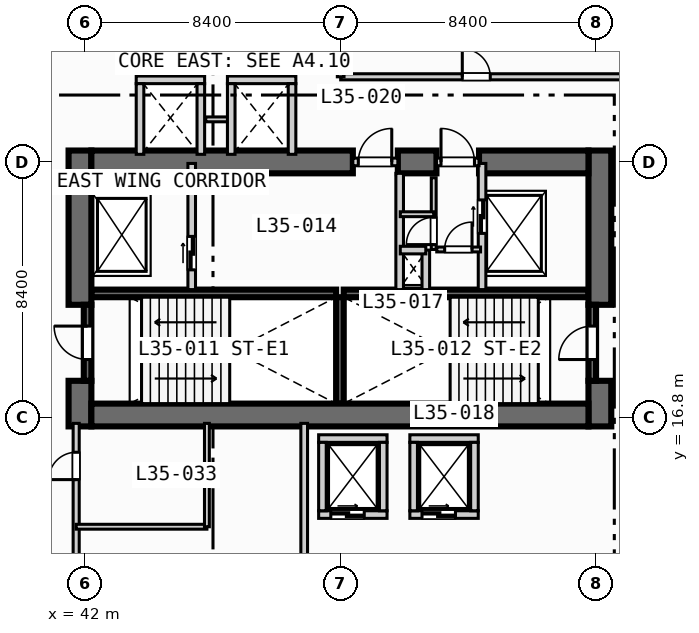
"""IFC4 building model, lengths in metres.
Left out: names, types, materials, properties, quantities, classifications, styles, units other than length and angle.
Written with IfcOpenShell. Run it as: python <this file> out.ifc"""

import sys

from ifc_helpers import new_model, si_unit, direction, frame, frame_2d, origin, place, context, subcontext, project, spatial, rectangle, extrude, element, fill, save


model = new_model("IFC4")
c1 = context("Model", 3, precision=1e-05, world=origin(), true_north=direction((0.0, 1.0)))
c2 = subcontext(c1, "Body", "Model", "MODEL_VIEW")
j1 = project(units=[si_unit("LENGTHUNIT", "METRE"), si_unit("PLANEANGLEUNIT", "RADIAN")], contexts=[c1])
p1 = place(None, origin())
s1 = spatial("IfcSite", under=j1, at=p1, CompositionType="ELEMENT")
p2 = place(p1, origin())
s2 = spatial("IfcBuilding", under=s1, at=p2, CompositionType="ELEMENT")
p3 = place(p2, frame((0.0, 0.0, 145.6)))
s3 = spatial("IfcBuildingStorey", under=s2, at=p3, CompositionType="ELEMENT", Elevation=145.6)
for number, where, z_axis, x_axis in (
    (1, (42.2, 20.875, 0.0), (0.0, 0.0, 1.0), (1.0, 0.0, 0.0)),
    (2, (50.5, 20.875, 0.0), (0.0, 0.0, 1.0), (1.0, 0.0, 0.0)),
):
    element("IfcWall", number, at=place(p3, frame(where, z_axis=z_axis, x_axis=x_axis)), inside=s3, PredefinedType="SOLIDWALL", context=c2, shape_type="SweptSolid", body=[
        extrude(rectangle(XDim=8.05, YDim=0.25, at=frame_2d((4.025, 0.0))), origin(), (0.0, 0.0, 1.0), 3.55),
    ])
p4 = place(p3, frame((50.375, 17.25, 0.0), z_axis=(0.0, 0.0, 1.0), x_axis=(0.0, 1.0, 0.0)))
e3 = element("IfcWall", 3, at=p4, inside=s3, PredefinedType="SOLIDWALL", context=c2, shape_type="SweptSolid", body=[
    extrude(rectangle(XDim=3.5, YDim=0.25, at=frame_2d((1.75, 0.0))), origin(), (0.0, 0.0, 1.0), 3.55),
])
p5 = place(p3, frame((41.825, 16.5, 0.0), z_axis=(0.0, 0.0, 1.0), x_axis=(0.0, 1.0, 0.0)))
e4 = element("IfcWall", 4, at=p5, inside=s3, PredefinedType="SHEAR", context=c2, shape_type="SweptSolid", body=[
    extrude(rectangle(XDim=1.5, YDim=0.75, at=frame_2d((0.75, 0.0))), origin(), (0.0, 0.0, 1.0), 3.55),
])
p6 = place(p3, frame((41.825, 20.5, 0.0), z_axis=(0.0, 0.0, 1.0), x_axis=(0.0, 1.0, 0.0)))
e5 = element("IfcWall", 5, at=p6, inside=s3, PredefinedType="SHEAR", context=c2, shape_type="SweptSolid", body=[
    extrude(rectangle(XDim=5.075, YDim=0.75, at=frame_2d((2.538, 0.0))), origin(), (0.0, 0.0, 1.0), 3.55),
])
p7 = place(p3, frame((58.925, 16.5, 0.0), z_axis=(0.0, 0.0, 1.0), x_axis=(0.0, 1.0, 0.0)))
e6 = element("IfcWall", 6, at=p7, inside=s3, PredefinedType="SHEAR", context=c2, shape_type="SweptSolid", body=[
    extrude(rectangle(XDim=1.5, YDim=0.75, at=frame_2d((0.75, 0.0))), origin(), (0.0, 0.0, 1.0), 3.55),
])
p8 = place(p3, frame((58.925, 20.5, 0.0), z_axis=(0.0, 0.0, 1.0), x_axis=(0.0, 1.0, 0.0)))
e7 = element("IfcWall", 7, at=p8, inside=s3, PredefinedType="SHEAR", context=c2, shape_type="SweptSolid", body=[
    extrude(rectangle(XDim=5.075, YDim=0.75, at=frame_2d((2.538, 0.0))), origin(), (0.0, 0.0, 1.0), 3.55),
])
p9 = place(p3, frame((42.2, 16.875, 0.0), z_axis=(0.0, 0.0, 1.0), x_axis=(1.0, 0.0, 0.0)))
e8 = element("IfcWall", 8, at=p9, inside=s3, PredefinedType="SHEAR", context=c2, shape_type="SweptSolid", body=[
    extrude(rectangle(XDim=16.35, YDim=0.75, at=frame_2d((8.175, 0.0))), origin(), (0.0, 0.0, 1.0), 3.55),
])
p10 = place(p3, frame((42.2, 25.2, 0.0), z_axis=(0.0, 0.0, 1.0), x_axis=(1.0, 0.0, 0.0)))
e9 = element("IfcWall", 9, at=p10, inside=s3, PredefinedType="SHEAR", context=c2, shape_type="SweptSolid", body=[
    extrude(rectangle(XDim=8.6, YDim=0.75, at=frame_2d((4.3, 0.0))), origin(), (0.0, 0.0, 1.0), 3.55),
])
p11 = place(p3, frame((52.28, 25.2, 0.0), z_axis=(0.0, 0.0, 1.0), x_axis=(1.0, 0.0, 0.0)))
e10 = element("IfcWall", 10, at=p11, inside=s3, PredefinedType="SHEAR", context=c2, shape_type="SweptSolid", body=[
    extrude(rectangle(XDim=1.27, YDim=0.75, at=frame_2d((0.635, 0.0))), origin(), (0.0, 0.0, 1.0), 3.55),
])
p12 = place(p3, frame((54.95, 25.2, 0.0), z_axis=(0.0, 0.0, 1.0), x_axis=(1.0, 0.0, 0.0)))
e11 = element("IfcWall", 11, at=p12, inside=s3, PredefinedType="SHEAR", context=c2, shape_type="SweptSolid", body=[
    extrude(rectangle(XDim=3.6, YDim=0.75, at=frame_2d((1.8, 0.0))), origin(), (0.0, 0.0, 1.0), 3.55),
])
p13 = place(p3, frame((42.075, 18.0, 0.0), z_axis=(0.0, 0.0, 1.0), x_axis=(0.0, 1.0, 0.0)))
e12 = element("IfcWall", 12, at=p13, inside=s3, PredefinedType="SOLIDWALL", context=c2, shape_type="SweptSolid", body=[
    extrude(rectangle(XDim=2.5, YDim=0.25, at=frame_2d((1.25, 0.0))), origin(), (0.0, 0.0, 1.0), 3.55),
])
p14 = place(p13, frame((0.7, 0.0, 0.0)))
e13 = element("IfcOpeningElement", 13, at=p14, cuts=e12, PredefinedType="OPENING", context=c2, shape_type="SweptSolid", body=[
    extrude(rectangle(XDim=1.1, YDim=2.15, at=frame_2d((0.55, 1.075))), frame((0.0, 0.135, 0.0), z_axis=(0.0, -1.0, 0.0), x_axis=(1.0, 0.0, 0.0)), (0.0, 0.0, 1.0), 0.27),
])
p15 = place(p3, frame((58.675, 18.0, 0.0), z_axis=(0.0, 0.0, 1.0), x_axis=(0.0, 1.0, 0.0)))
e14 = element("IfcWall", 14, at=p15, inside=s3, PredefinedType="SOLIDWALL", context=c2, shape_type="SweptSolid", body=[
    extrude(rectangle(XDim=2.5, YDim=0.25, at=frame_2d((1.25, 0.0))), origin(), (0.0, 0.0, 1.0), 3.55),
])
p16 = place(p15, frame((0.7, 0.0, 0.0)))
e15 = element("IfcOpeningElement", 15, at=p16, cuts=e14, PredefinedType="OPENING", context=c2, shape_type="SweptSolid", body=[
    extrude(rectangle(XDim=1.1, YDim=2.15, at=frame_2d((0.55, 1.075))), frame((0.0, 0.135, 0.0), z_axis=(0.0, -1.0, 0.0), x_axis=(1.0, 0.0, 0.0)), (0.0, 0.0, 1.0), 0.27),
])
p17 = place(p3, frame((45.5, 21.0, 0.0), z_axis=(0.0, 0.0, 1.0), x_axis=(0.0, 1.0, 0.0)))
e16 = element("IfcWall", 16, at=p17, inside=s3, PredefinedType="SOLIDWALL", context=c2, shape_type="SweptSolid", body=[
    extrude(rectangle(XDim=4.15, YDim=0.25, at=frame_2d((2.075, 0.0))), origin(), (0.0, 0.0, 1.0), 3.55),
])
p18 = place(p17, frame((0.65, 0.0, 0.0)))
e17 = element("IfcOpeningElement", 17, at=p18, cuts=e16, PredefinedType="OPENING", context=c2, shape_type="SweptSolid", body=[
    extrude(rectangle(XDim=1.1, YDim=2.15, at=frame_2d((0.55, 1.075))), frame((0.0, 0.135, 0.0), z_axis=(0.0, -1.0, 0.0), x_axis=(1.0, 0.0, 0.0)), (0.0, 0.0, 1.0), 0.27),
])
p19 = place(p3, frame((50.8, 25.2, 0.0), z_axis=(0.0, 0.0, 1.0), x_axis=(1.0, 0.0, 0.0)))
e18 = element("IfcWall", 18, at=p19, inside=s3, PredefinedType="SOLIDWALL", context=c2, shape_type="SweptSolid", body=[
    extrude(rectangle(XDim=1.48, YDim=0.25, at=frame_2d((0.74, 0.0))), origin(), (0.0, 0.0, 1.0), 3.55),
])
p20 = place(p19, frame((0.18, 0.0, 0.0)))
e19 = element("IfcOpeningElement", 19, at=p20, cuts=e18, PredefinedType="OPENING", context=c2, shape_type="SweptSolid", body=[
    extrude(rectangle(XDim=1.1, YDim=2.15, at=frame_2d((0.55, 1.075))), frame((0.0, 0.135, 0.0), z_axis=(0.0, -1.0, 0.0), x_axis=(1.0, 0.0, 0.0)), (0.0, 0.0, 1.0), 0.27),
])
p21 = place(p3, frame((52.34, 21.0, 0.0), z_axis=(0.0, 0.0, 1.0), x_axis=(0.0, 1.0, 0.0)))
e20 = element("IfcWall", 20, at=p21, inside=s3, PredefinedType="SOLIDWALL", context=c2, shape_type="SweptSolid", body=[
    extrude(rectangle(XDim=3.825, YDim=0.25, at=frame_2d((1.913, 0.0))), origin(), (0.0, 0.0, 1.0), 3.55),
])
p22 = place(p3, frame((55.05, 21.0, 0.0), z_axis=(0.0, 0.0, 1.0), x_axis=(0.0, 1.0, 0.0)))
e21 = element("IfcWall", 21, at=p22, inside=s3, PredefinedType="SOLIDWALL", context=c2, shape_type="SweptSolid", body=[
    extrude(rectangle(XDim=4.15, YDim=0.25, at=frame_2d((2.075, 0.0))), origin(), (0.0, 0.0, 1.0), 3.55),
])
p23 = place(p22, frame((1.85, 0.0, 0.0)))
e22 = element("IfcOpeningElement", 22, at=p23, cuts=e21, PredefinedType="OPENING", context=c2, shape_type="SweptSolid", body=[
    extrude(rectangle(XDim=1.1, YDim=2.15, at=frame_2d((0.55, 1.075))), frame((0.0, 0.135, 0.0), z_axis=(0.0, -1.0, 0.0), x_axis=(1.0, 0.0, 0.0)), (0.0, 0.0, 1.0), 0.27),
])
p24 = place(p3, frame((53.55, 25.2, 0.0), z_axis=(0.0, 0.0, 1.0), x_axis=(1.0, 0.0, 0.0)))
e23 = element("IfcWall", 23, at=p24, inside=s3, PredefinedType="SOLIDWALL", context=c2, shape_type="SweptSolid", body=[
    extrude(rectangle(XDim=1.4, YDim=0.25, at=frame_2d((0.7, 0.0))), origin(), (0.0, 0.0, 1.0), 3.55),
])
p25 = place(p24, frame((0.15, 0.0, 0.0)))
e24 = element("IfcOpeningElement", 24, at=p25, cuts=e23, PredefinedType="OPENING", context=c2, shape_type="SweptSolid", body=[
    extrude(rectangle(XDim=1.1, YDim=2.15, at=frame_2d((0.55, 1.075))), frame((0.0, 0.135, 0.0), z_axis=(0.0, -1.0, 0.0), x_axis=(1.0, 0.0, 0.0)), (0.0, 0.0, 1.0), 0.27),
])
p26 = place(p3, frame((53.2, 21.0, 0.0), z_axis=(0.0, 0.0, 1.0), x_axis=(0.0, 1.0, 0.0)))
e25 = element("IfcWall", 25, at=p26, inside=s3, PredefinedType="SOLIDWALL", context=c2, shape_type="SweptSolid", body=[
    extrude(rectangle(XDim=1.3, YDim=0.25, at=frame_2d((0.65, 0.0))), origin(), (0.0, 0.0, 1.0), 3.55),
])
p27 = place(p3, frame((52.36, 22.3, 0.0), z_axis=(0.0, 0.0, 1.0), x_axis=(1.0, 0.0, 0.0)))
e26 = element("IfcWall", 26, at=p27, inside=s3, PredefinedType="SOLIDWALL", context=c2, shape_type="SweptSolid", body=[
    extrude(rectangle(XDim=0.84, YDim=0.25, at=frame_2d((0.42, 0.0))), origin(), (0.0, 0.0, 1.0), 3.55),
])
p28 = place(p3, frame((53.56, 22.32, 0.0), z_axis=(0.0, 0.0, 1.0), x_axis=(1.0, 0.0, 0.0)))
e27 = element("IfcWall", 27, at=p28, inside=s3, PredefinedType="PARTITIONING", context=c2, shape_type="SweptSolid", body=[
    extrude(rectangle(XDim=1.44, YDim=0.16, at=frame_2d((0.72, 0.0))), origin(), (0.0, 0.0, 1.0), 3.55),
])
p29 = place(p28, frame((0.26, 0.0, 0.0)))
e28 = element("IfcOpeningElement", 28, at=p29, cuts=e27, PredefinedType="OPENING", context=c2, shape_type="SweptSolid", body=[
    extrude(rectangle(XDim=0.9, YDim=2.1, at=frame_2d((0.45, 1.05))), frame((0.0, 0.09, 0.0), z_axis=(0.0, -1.0, 0.0), x_axis=(1.0, 0.0, 0.0)), (0.0, 0.0, 1.0), 0.18),
])
p30 = place(p3, frame((53.46, 22.32, 0.0), z_axis=(0.0, 0.0, 1.0), x_axis=(0.0, 1.0, 0.0)))
e29 = element("IfcWall", 29, at=p30, inside=s3, PredefinedType="PARTITIONING", context=c2, shape_type="SweptSolid", body=[
    extrude(rectangle(XDim=2.36, YDim=0.16, at=frame_2d((1.18, 0.0))), origin(), (0.0, 0.0, 1.0), 3.55),
])
p31 = place(p30, frame((0.16, 0.0, 0.0)))
e30 = element("IfcOpeningElement", 30, at=p31, cuts=e29, PredefinedType="OPENING", context=c2, shape_type="SweptSolid", body=[
    extrude(rectangle(XDim=0.9, YDim=2.1, at=frame_2d((0.45, 1.05))), frame((0.0, 0.09, 0.0), z_axis=(0.0, -1.0, 0.0), x_axis=(1.0, 0.0, 0.0)), (0.0, 0.0, 1.0), 0.18),
])
p32 = place(p3, frame((52.36, 23.48, 0.0), z_axis=(0.0, 0.0, 1.0), x_axis=(1.0, 0.0, 0.0)))
e31 = element("IfcWall", 31, at=p32, inside=s3, PredefinedType="PARTITIONING", context=c2, shape_type="SweptSolid", body=[
    extrude(rectangle(XDim=1.1, YDim=0.16, at=frame_2d((0.55, 0.0))), origin(), (0.0, 0.0, 1.0), 3.55),
])
p33 = place(p3, frame((49.675, 13.6, 0.0), z_axis=(0.0, 0.0, 1.0), x_axis=(1.0, 0.0, 0.0)))
e32 = element("IfcWall", 32, at=p33, inside=s3, PredefinedType="SOLIDWALL", context=c2, shape_type="SweptSolid", body=[
    extrude(rectangle(XDim=2.25, YDim=0.25, at=frame_2d((1.125, 0.0))), origin(), (0.0, 0.0, 1.0), 3.55),
])
p34 = place(p33, frame((0.4, 0.0, 0.0)))
e33 = element("IfcOpeningElement", 33, at=p34, cuts=e32, PredefinedType="OPENING", context=c2, shape_type="SweptSolid", body=[
    extrude(rectangle(XDim=1.1, YDim=2.15, at=frame_2d((0.55, 1.075))), frame((0.0, 0.135, 0.0), z_axis=(0.0, -1.0, 0.0), x_axis=(1.0, 0.0, 0.0)), (0.0, 0.0, 1.0), 0.27),
])
for number, where, z_axis, x_axis in (
    (34, (49.675, 16.1, 0.0), (0.0, 0.0, 1.0), (1.0, 0.0, 0.0)),
    (35, (49.8, 13.725, 0.0), (0.0, 0.0, 1.0), (0.0, 1.0, 0.0)),
    (36, (51.8, 13.725, 0.0), (0.0, 0.0, 1.0), (0.0, 1.0, 0.0)),
):
    element("IfcWall", number, at=place(p3, frame(where, z_axis=z_axis, x_axis=x_axis)), inside=s3, PredefinedType="SOLIDWALL", context=c2, shape_type="SweptSolid", body=[
        extrude(rectangle(XDim=2.25, YDim=0.25, at=frame_2d((1.125, 0.0))), origin(), (0.0, 0.0, 1.0), 3.55),
    ])
p35 = place(p3, frame((52.675, 13.6, 0.0), z_axis=(0.0, 0.0, 1.0), x_axis=(1.0, 0.0, 0.0)))
e37 = element("IfcWall", 37, at=p35, inside=s3, PredefinedType="SOLIDWALL", context=c2, shape_type="SweptSolid", body=[
    extrude(rectangle(XDim=2.25, YDim=0.25, at=frame_2d((1.125, 0.0))), origin(), (0.0, 0.0, 1.0), 3.55),
])
p36 = place(p35, frame((0.4, 0.0, 0.0)))
e38 = element("IfcOpeningElement", 38, at=p36, cuts=e37, PredefinedType="OPENING", context=c2, shape_type="SweptSolid", body=[
    extrude(rectangle(XDim=1.1, YDim=2.15, at=frame_2d((0.55, 1.075))), frame((0.0, 0.135, 0.0), z_axis=(0.0, -1.0, 0.0), x_axis=(1.0, 0.0, 0.0)), (0.0, 0.0, 1.0), 0.27),
])
for number, where, z_axis, x_axis in (
    (39, (52.675, 16.1, 0.0), (0.0, 0.0, 1.0), (1.0, 0.0, 0.0)),
    (40, (52.8, 13.725, 0.0), (0.0, 0.0, 1.0), (0.0, 1.0, 0.0)),
    (41, (54.8, 13.725, 0.0), (0.0, 0.0, 1.0), (0.0, 1.0, 0.0)),
    (42, (43.675, 27.9, 0.0), (0.0, 0.0, 1.0), (1.0, 0.0, 0.0)),
):
    element("IfcWall", number, at=place(p3, frame(where, z_axis=z_axis, x_axis=x_axis)), inside=s3, PredefinedType="SOLIDWALL", context=c2, shape_type="SweptSolid", body=[
        extrude(rectangle(XDim=2.25, YDim=0.25, at=frame_2d((1.125, 0.0))), origin(), (0.0, 0.0, 1.0), 3.55),
    ])
for number, where, z_axis, x_axis in (
    (43, (43.8, 25.45, 0.0), (0.0, 0.0, 1.0), (0.0, 1.0, 0.0)),
    (44, (45.8, 25.45, 0.0), (0.0, 0.0, 1.0), (0.0, 1.0, 0.0)),
):
    element("IfcWall", number, at=place(p3, frame(where, z_axis=z_axis, x_axis=x_axis)), inside=s3, PredefinedType="SOLIDWALL", context=c2, shape_type="SweptSolid", body=[
        extrude(rectangle(XDim=2.325, YDim=0.25, at=frame_2d((1.163, 0.0))), origin(), (0.0, 0.0, 1.0), 3.55),
    ])
p37 = place(p3, frame((45.96, 26.6, 0.0), z_axis=(0.0, 0.0, 1.0), x_axis=(1.0, 0.0, 0.0)))
e45 = element("IfcWall", 45, at=p37, inside=s3, PredefinedType="PARTITIONING", context=c2, shape_type="SweptSolid", body=[
    extrude(rectangle(XDim=0.88, YDim=0.16, at=frame_2d((0.44, 0.0))), origin(), (0.0, 0.0, 1.0), 3.55),
])
p38 = place(p3, frame((46.675, 27.9, 0.0), z_axis=(0.0, 0.0, 1.0), x_axis=(1.0, 0.0, 0.0)))
e46 = element("IfcWall", 46, at=p38, inside=s3, PredefinedType="SOLIDWALL", context=c2, shape_type="SweptSolid", body=[
    extrude(rectangle(XDim=2.25, YDim=0.25, at=frame_2d((1.125, 0.0))), origin(), (0.0, 0.0, 1.0), 3.55),
])
for number, where, z_axis, x_axis in (
    (47, (46.8, 25.45, 0.0), (0.0, 0.0, 1.0), (0.0, 1.0, 0.0)),
    (48, (48.8, 25.45, 0.0), (0.0, 0.0, 1.0), (0.0, 1.0, 0.0)),
):
    element("IfcWall", number, at=place(p3, frame(where, z_axis=z_axis, x_axis=x_axis)), inside=s3, PredefinedType="SOLIDWALL", context=c2, shape_type="SweptSolid", body=[
        extrude(rectangle(XDim=2.325, YDim=0.25, at=frame_2d((1.163, 0.0))), origin(), (0.0, 0.0, 1.0), 3.55),
    ])
p39 = place(p3, frame((41.7, 0.35, 0.0), z_axis=(0.0, 0.0, 1.0), x_axis=(0.0, 1.0, 0.0)))
e49 = element("IfcWall", 49, at=p39, inside=s3, PredefinedType="PARTITIONING", context=c2, shape_type="SweptSolid", body=[
    extrude(rectangle(XDim=16.25, YDim=0.2, at=frame_2d((8.125, 0.0))), origin(), (0.0, 0.0, 1.0), 2.8),
])
p40 = place(p39, frame((5.0, 0.0, 0.0)))
e50 = element("IfcOpeningElement", 50, at=p40, cuts=e49, PredefinedType="OPENING", context=c2, shape_type="SweptSolid", body=[
    extrude(rectangle(XDim=0.92, YDim=2.1, at=frame_2d((0.46, 1.05))), frame((0.0, 0.11, 0.0), z_axis=(0.0, -1.0, 0.0), x_axis=(1.0, 0.0, 0.0)), (0.0, 0.0, 1.0), 0.22),
])
p41 = place(p39, frame((14.4, 0.0, 0.0)))
e51 = element("IfcOpeningElement", 51, at=p41, cuts=e49, PredefinedType="OPENING", context=c2, shape_type="SweptSolid", body=[
    extrude(rectangle(XDim=0.9, YDim=2.1, at=frame_2d((0.45, 1.05))), frame((0.0, 0.11, 0.0), z_axis=(0.0, -1.0, 0.0), x_axis=(1.0, 0.0, 0.0)), (0.0, 0.0, 1.0), 0.22),
])
p42 = place(p3, frame((49.2, 0.35, 0.0), z_axis=(0.0, 0.0, 1.0), x_axis=(0.0, 1.0, 0.0)))
e52 = element("IfcWall", 52, at=p42, inside=s3, PredefinedType="PARTITIONING", context=c2, shape_type="SweptSolid", body=[
    extrude(rectangle(XDim=16.25, YDim=0.22, at=frame_2d((8.125, 0.0))), origin(), (0.0, 0.0, 1.0), 3.55),
])
p43 = place(p3, frame((41.7, 13.2, 0.0), z_axis=(0.0, 0.0, 1.0), x_axis=(1.0, 0.0, 0.0)))
e53 = element("IfcWall", 53, at=p43, inside=s3, PredefinedType="PARTITIONING", context=c2, shape_type="SweptSolid", body=[
    extrude(rectangle(XDim=4.3, YDim=0.16, at=frame_2d((2.15, 0.0))), origin(), (0.0, 0.0, 1.0), 3.55),
])
p44 = place(p3, frame((46.0, 13.2, 0.0), z_axis=(0.0, 0.0, 1.0), x_axis=(0.0, 1.0, 0.0)))
e54 = element("IfcWall", 54, at=p44, inside=s3, PredefinedType="PARTITIONING", context=c2, shape_type="SweptSolid", body=[
    extrude(rectangle(XDim=3.4, YDim=0.16, at=frame_2d((1.7, 0.0))), origin(), (0.0, 0.0, 1.0), 3.55),
])
p45 = place(p3, frame((50.4, 28.0, 0.0), z_axis=(0.0, 0.0, 1.0), x_axis=(1.0, 0.0, 0.0)))
e55 = element("IfcWall", 55, at=p45, inside=s3, PredefinedType="PARTITIONING", context=c2, shape_type="SweptSolid", body=[
    extrude(rectangle(XDim=21.8, YDim=0.2, at=frame_2d((10.9, 0.0))), origin(), (0.0, 0.0, 1.0), 3.55),
])
p46 = place(p45, frame((4.0, 0.0, 0.0)))
e56 = element("IfcOpeningElement", 56, at=p46, cuts=e55, PredefinedType="OPENING", context=c2, shape_type="SweptSolid", body=[
    extrude(rectangle(XDim=0.92, YDim=2.1, at=frame_2d((0.46, 1.05))), frame((0.0, 0.11, 0.0), z_axis=(0.0, -1.0, 0.0), x_axis=(1.0, 0.0, 0.0)), (0.0, 0.0, 1.0), 0.22),
])
p47 = place(p3, frame((50.4, 28.0, 0.0), z_axis=(0.0, 0.0, 1.0), x_axis=(0.0, 1.0, 0.0)))
e57 = element("IfcWall", 57, at=p47, inside=s3, PredefinedType="PARTITIONING", context=c2, shape_type="SweptSolid", body=[
    extrude(rectangle(XDim=5.3, YDim=0.22, at=frame_2d((2.65, 0.0))), origin(), (0.0, 0.0, 1.0), 3.133),
])
p48 = place(p14, origin())
e58 = element("IfcDoor", 58, at=p48, inside=s3, OperationType="SINGLE_SWING_RIGHT", PredefinedType="DOOR", context=c2, shape_type="SweptSolid", body=[
    extrude(rectangle(XDim=1.1, YDim=2.15, at=frame_2d((0.55, 1.075))), frame((0.0, 0.025, 0.0), z_axis=(0.0, -1.0, 0.0), x_axis=(1.0, 0.0, 0.0)), (0.0, 0.0, 1.0), 0.05),
])
fill(e13, e58)
p49 = place(p16, origin())
e59 = element("IfcDoor", 59, at=p49, inside=s3, OperationType="SINGLE_SWING_LEFT", PredefinedType="DOOR", context=c2, shape_type="SweptSolid", body=[
    extrude(rectangle(XDim=1.1, YDim=2.15, at=frame_2d((0.55, 1.075))), frame((0.0, 0.025, 0.0), z_axis=(0.0, -1.0, 0.0), x_axis=(1.0, 0.0, 0.0)), (0.0, 0.0, 1.0), 0.05),
])
fill(e15, e59)
p50 = place(p18, origin())
e60 = element("IfcDoor", 60, at=p50, inside=s3, OperationType="SLIDING_TO_LEFT", PredefinedType="DOOR", context=c2, shape_type="SweptSolid", body=[
    extrude(rectangle(XDim=1.1, YDim=2.15, at=frame_2d((0.55, 1.075))), frame((0.0, 0.025, 0.0), z_axis=(0.0, -1.0, 0.0), x_axis=(1.0, 0.0, 0.0)), (0.0, 0.0, 1.0), 0.05),
])
fill(e17, e60)
p51 = place(p20, origin())
e61 = element("IfcDoor", 61, at=p51, inside=s3, OperationType="SINGLE_SWING_RIGHT", PredefinedType="DOOR", context=c2, shape_type="SweptSolid", body=[
    extrude(rectangle(XDim=1.1, YDim=2.15, at=frame_2d((0.55, 1.075))), frame((0.0, 0.025, 0.0), z_axis=(0.0, -1.0, 0.0), x_axis=(1.0, 0.0, 0.0)), (0.0, 0.0, 1.0), 0.05),
])
fill(e19, e61)
p52 = place(p23, origin())
e62 = element("IfcDoor", 62, at=p52, inside=s3, OperationType="SLIDING_TO_LEFT", PredefinedType="DOOR", context=c2, shape_type="SweptSolid", body=[
    extrude(rectangle(XDim=1.1, YDim=2.15, at=frame_2d((0.55, 1.075))), frame((0.0, 0.025, 0.0), z_axis=(0.0, -1.0, 0.0), x_axis=(1.0, 0.0, 0.0)), (0.0, 0.0, 1.0), 0.05),
])
fill(e22, e62)
p53 = place(p25, origin())
e63 = element("IfcDoor", 63, at=p53, inside=s3, OperationType="SINGLE_SWING_LEFT", PredefinedType="DOOR", context=c2, shape_type="SweptSolid", body=[
    extrude(rectangle(XDim=1.1, YDim=2.15, at=frame_2d((0.55, 1.075))), frame((0.0, 0.025, 0.0), z_axis=(0.0, -1.0, 0.0), x_axis=(1.0, 0.0, 0.0)), (0.0, 0.0, 1.0), 0.05),
])
fill(e24, e63)
p54 = place(p29, origin())
e64 = element("IfcDoor", 64, at=p54, inside=s3, OperationType="SINGLE_SWING_RIGHT", PredefinedType="DOOR", context=c2, shape_type="SweptSolid", body=[
    extrude(rectangle(XDim=0.9, YDim=2.1, at=frame_2d((0.45, 1.05))), frame((0.0, 0.025, 0.0), z_axis=(0.0, -1.0, 0.0), x_axis=(1.0, 0.0, 0.0)), (0.0, 0.0, 1.0), 0.05),
])
fill(e28, e64)
p55 = place(p31, origin())
e65 = element("IfcDoor", 65, at=p55, inside=s3, OperationType="SINGLE_SWING_LEFT", PredefinedType="DOOR", context=c2, shape_type="SweptSolid", body=[
    extrude(rectangle(XDim=0.9, YDim=2.1, at=frame_2d((0.45, 1.05))), frame((0.0, 0.025, 0.0), z_axis=(0.0, -1.0, 0.0), x_axis=(1.0, 0.0, 0.0)), (0.0, 0.0, 1.0), 0.05),
])
fill(e30, e65)
p56 = place(p34, origin())
e66 = element("IfcDoor", 66, at=p56, inside=s3, OperationType="SLIDING_TO_LEFT", PredefinedType="DOOR", context=c2, shape_type="SweptSolid", body=[
    extrude(rectangle(XDim=1.1, YDim=2.15, at=frame_2d((0.55, 1.075))), frame((0.0, 0.025, 0.0), z_axis=(0.0, -1.0, 0.0), x_axis=(1.0, 0.0, 0.0)), (0.0, 0.0, 1.0), 0.05),
])
fill(e33, e66)
p57 = place(p36, origin())
e67 = element("IfcDoor", 67, at=p57, inside=s3, OperationType="SLIDING_TO_LEFT", PredefinedType="DOOR", context=c2, shape_type="SweptSolid", body=[
    extrude(rectangle(XDim=1.1, YDim=2.15, at=frame_2d((0.55, 1.075))), frame((0.0, 0.025, 0.0), z_axis=(0.0, -1.0, 0.0), x_axis=(1.0, 0.0, 0.0)), (0.0, 0.0, 1.0), 0.05),
])
fill(e38, e67)
p58 = place(p41, origin())
e68 = element("IfcDoor", 68, at=p58, inside=s3, OperationType="SINGLE_SWING_LEFT", PredefinedType="DOOR", context=c2, shape_type="SweptSolid", body=[
    extrude(rectangle(XDim=0.9, YDim=2.1, at=frame_2d((0.45, 1.05))), frame((0.0, 0.025, 0.0), z_axis=(0.0, -1.0, 0.0), x_axis=(1.0, 0.0, 0.0)), (0.0, 0.0, 1.0), 0.05),
])
fill(e51, e68)
p59 = place(p46, origin())
e69 = element("IfcDoor", 69, at=p59, inside=s3, OperationType="SINGLE_SWING_LEFT", PredefinedType="DOOR", context=c2, shape_type="SweptSolid", body=[
    extrude(rectangle(XDim=0.92, YDim=2.1, at=frame_2d((0.46, 1.05))), frame((0.0, 0.025, 0.0), z_axis=(0.0, -1.0, 0.0), x_axis=(1.0, 0.0, 0.0)), (0.0, 0.0, 1.0), 0.05),
])
fill(e56, e69)
save(model, sys.argv[1])
